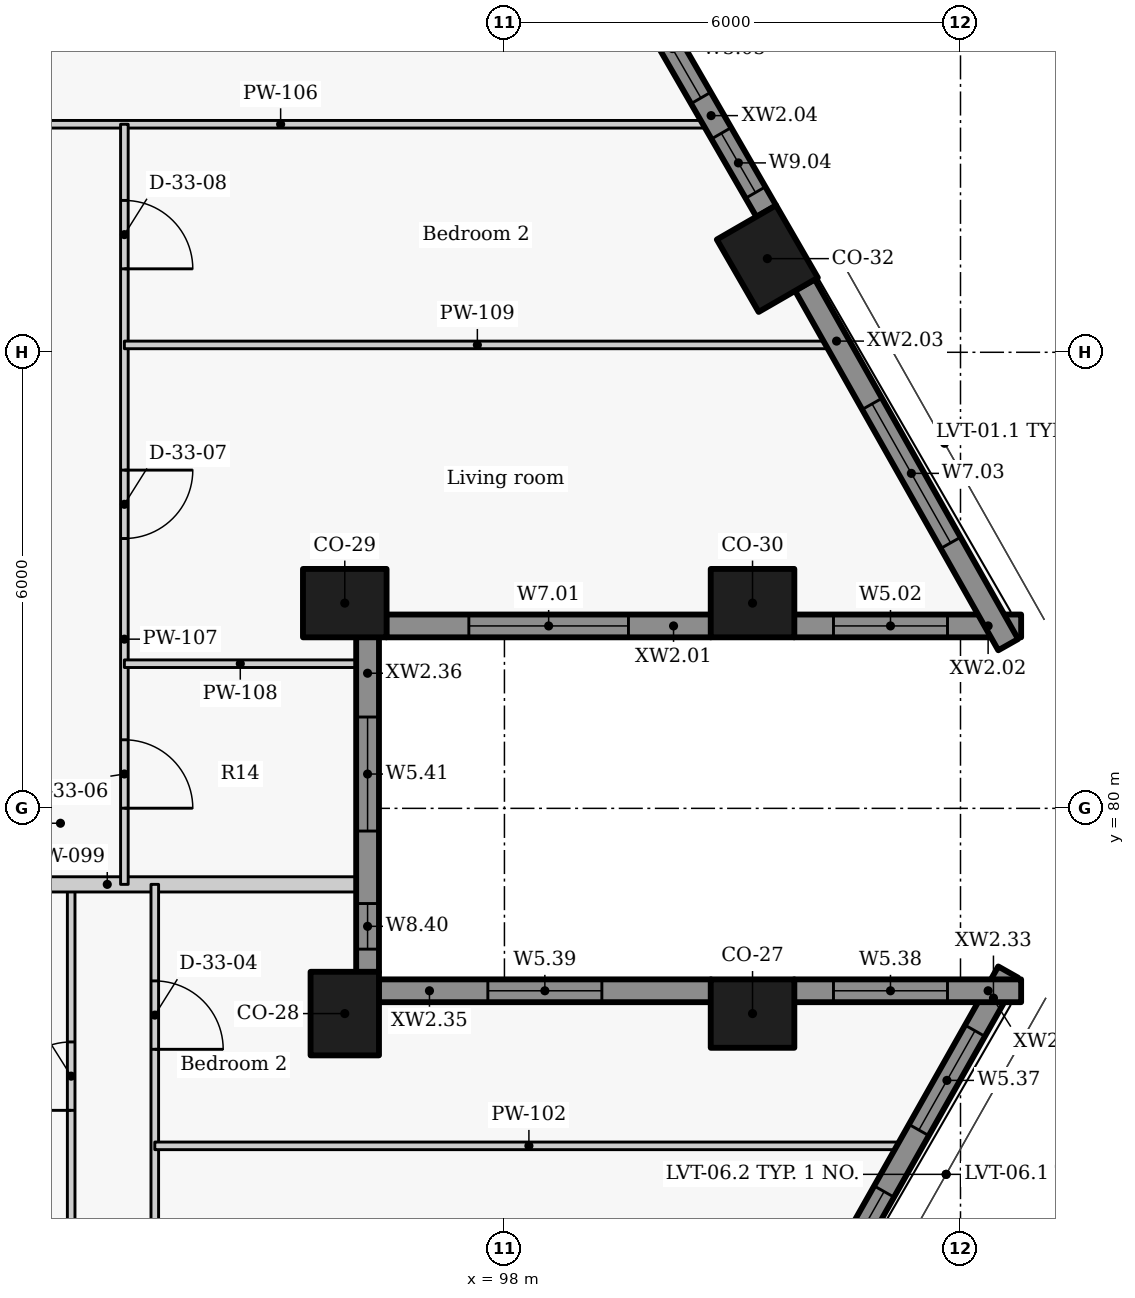
"""IFC4 building model, lengths in metres.
Left out: names, types, materials, properties, quantities, classifications, styles, units other than length and angle.
Written with IfcOpenShell. Run it as: python <this file> out.ifc"""

import sys

from ifc_helpers import new_model, si_unit, direction, frame, frame_2d, origin, origin_2d, place, context, subcontext, project, spatial, rectangle, extrude, element, fill, save


model = new_model("IFC4")
c1 = context("Model", 3, precision=1e-05, world=origin(), true_north=direction((0.0, 1.0)))
c2 = subcontext(c1, "Body", "Model", "MODEL_VIEW")
j1 = project(units=[si_unit("LENGTHUNIT", "METRE"), si_unit("PLANEANGLEUNIT", "RADIAN")], contexts=[c1])
p1 = place(None, origin())
s1 = spatial("IfcSite", under=j1, at=p1, CompositionType="ELEMENT")
p2 = place(p1, origin())
s2 = spatial("IfcBuilding", under=s1, at=p2, CompositionType="ELEMENT")
p3 = place(p2, frame((0.0, 0.0, 269.1)))
s3 = spatial("IfcBuildingStorey", under=s2, at=p3, CompositionType="ELEMENT", Elevation=269.1)
for number, where, z_axis, x_axis in (
    (1, (101.264, 77.3, 0.0), (0.0, 0.0, 1.0), (-1.0, 0.0, 0.0)),
    (2, (95.899, 77.3, 0.0), (0.0, 0.0, 1.0), (0.0, 1.0, 0.0)),
    (3, (95.899, 82.7, 0.0), (0.0, 0.0, 1.0), (1.0, 0.0, 0.0)),
    (4, (101.264, 82.7, 0.0), (0.0, 0.0, 1.0), (1.0, 0.0, 0.0)),
    (5, (101.459, 87.232, 0.0), (0.0, 0.0, 1.0), (-0.5, 0.866, 0.0)),
):
    element("IfcColumn", number, at=place(p3, frame(where, z_axis=z_axis, x_axis=x_axis)), inside=s3, PredefinedType="COLUMN", context=c2, shape_type="SweptSolid", body=[
        extrude(rectangle(XDim=1.1, YDim=0.9, at=origin_2d()), origin(), (0.0, 0.0, 1.0), 3.3),
    ])
p4 = place(p3, frame((96.446, 82.4, 0.0), z_axis=(0.0, 0.0, 1.0), x_axis=(1.0, 0.0, 0.0)))
e6 = element("IfcWall", 6, at=p4, inside=s3, PredefinedType="SOLIDWALL", context=c2, shape_type="SweptSolid", body=[
    extrude(rectangle(XDim=4.272, YDim=0.3, at=frame_2d((2.136, 0.0))), origin(), (0.0, 0.0, 1.0), 2.125),
])
p5 = place(p4, frame((1.086, 0.0, 0.9)))
e7 = element("IfcOpeningElement", 7, at=p5, cuts=e6, PredefinedType="OPENING", context=c2, shape_type="SweptSolid", body=[
    extrude(rectangle(XDim=2.1, YDim=1.1, at=frame_2d((1.05, 0.55))), frame((0.0, 0.16, 0.0), z_axis=(0.0, -1.0, 0.0), x_axis=(1.0, 0.0, 0.0)), (0.0, 0.0, 1.0), 0.32),
])
p6 = place(p3, frame((101.81, 82.4, 0.0), z_axis=(0.0, 0.0, 1.0), x_axis=(1.0, 0.0, 0.0)))
e8 = element("IfcWall", 8, at=p6, inside=s3, PredefinedType="SOLIDWALL", context=c2, shape_type="SweptSolid", body=[
    extrude(rectangle(XDim=2.988, YDim=0.3, at=frame_2d((1.494, 0.0))), origin(), (0.0, 0.0, 1.0), 2.125),
])
p7 = place(p6, frame((0.519, 0.0, 0.9)))
e9 = element("IfcOpeningElement", 9, at=p7, cuts=e8, PredefinedType="OPENING", context=c2, shape_type="SweptSolid", body=[
    extrude(rectangle(XDim=1.5, YDim=1.1, at=frame_2d((0.75, 0.55))), frame((0.0, 0.16, 0.0), z_axis=(0.0, -1.0, 0.0), x_axis=(1.0, 0.0, 0.0)), (0.0, 0.0, 1.0), 0.32),
])
p8 = place(p3, frame((104.627, 82.154, 0.0), z_axis=(0.0, 0.0, 1.0), x_axis=(-0.492080931903, 0.870549456641, 0.0)))
e10 = element("IfcWall", 10, at=p8, inside=s3, PredefinedType="SOLIDWALL", context=c2, shape_type="SweptSolid", body=[
    extrude(rectangle(XDim=5.437, YDim=0.3, at=frame_2d((2.718, 0.0))), origin(), (0.0, 0.0, 1.0), 2.125),
])
p9 = place(p8, frame((1.539, 0.0, 0.9)))
e11 = element("IfcOpeningElement", 11, at=p9, cuts=e10, PredefinedType="OPENING", context=c2, shape_type="SweptSolid", body=[
    extrude(rectangle(XDim=2.1, YDim=1.1, at=frame_2d((1.05, 0.55))), frame((0.0, 0.16, 0.0), z_axis=(0.0, -1.0, 0.0), x_axis=(1.0, 0.0, 0.0)), (0.0, 0.0, 1.0), 0.32),
])
p10 = place(p3, frame((101.446, 87.855, 0.0), z_axis=(0.0, 0.0, 1.0), x_axis=(-0.500010404316, 0.866019396766, 0.0)))
e12 = element("IfcWall", 12, at=p10, inside=s3, PredefinedType="SOLIDWALL", context=c2, shape_type="SweptSolid", body=[
    extrude(rectangle(XDim=3.547, YDim=0.3, at=frame_2d((1.774, 0.0))), origin(), (0.0, 0.0, 1.0), 2.125),
])
p11 = place(p10, frame((0.285, 0.0, 0.9)))
e13 = element("IfcOpeningElement", 13, at=p11, cuts=e12, PredefinedType="OPENING", context=c2, shape_type="SweptSolid", body=[
    extrude(rectangle(XDim=0.9, YDim=1.1, at=frame_2d((0.45, 0.55))), frame((0.0, 0.16, 0.0), z_axis=(0.0, -1.0, 0.0), x_axis=(1.0, 0.0, 0.0)), (0.0, 0.0, 1.0), 0.32),
])
p12 = place(p10, frame((1.722, 0.0, 0.9)))
e14 = element("IfcOpeningElement", 14, at=p12, cuts=e12, PredefinedType="OPENING", context=c2, shape_type="SweptSolid", body=[
    extrude(rectangle(XDim=1.5, YDim=1.1, at=frame_2d((0.75, 0.55))), frame((0.0, 0.16, 0.0), z_axis=(0.0, -1.0, 0.0), x_axis=(1.0, 0.0, 0.0)), (0.0, 0.0, 1.0), 0.32),
])
p13 = place(p3, frame((101.952, 73.114, 0.0), z_axis=(0.0, 0.0, 1.0), x_axis=(0.492080931903, 0.870549456641, 0.0)))
e15 = element("IfcWall", 15, at=p13, inside=s3, PredefinedType="SOLIDWALL", context=c2, shape_type="SweptSolid", body=[
    extrude(rectangle(XDim=5.437, YDim=0.3, at=frame_2d((2.718, 0.0))), origin(), (0.0, 0.0, 1.0), 2.125),
])
p14 = place(p13, frame((0.62, 0.0, 0.9)))
e16 = element("IfcOpeningElement", 16, at=p14, cuts=e15, PredefinedType="OPENING", context=c2, shape_type="SweptSolid", body=[
    extrude(rectangle(XDim=1.5, YDim=1.1, at=frame_2d((0.75, 0.55))), frame((0.0, 0.16, 0.0), z_axis=(0.0, -1.0, 0.0), x_axis=(1.0, 0.0, 0.0)), (0.0, 0.0, 1.0), 0.32),
])
p15 = place(p13, frame((3.05, 0.0, 0.9)))
e17 = element("IfcOpeningElement", 17, at=p15, cuts=e15, PredefinedType="OPENING", context=c2, shape_type="SweptSolid", body=[
    extrude(rectangle(XDim=1.5, YDim=1.1, at=frame_2d((0.75, 0.55))), frame((0.0, 0.16, 0.0), z_axis=(0.0, -1.0, 0.0), x_axis=(1.0, 0.0, 0.0)), (0.0, 0.0, 1.0), 0.32),
])
p16 = place(p3, frame((104.798, 77.6, 0.0), z_axis=(0.0, 0.0, 1.0), x_axis=(-1.0, 0.0, 0.0)))
e18 = element("IfcWall", 18, at=p16, inside=s3, PredefinedType="SOLIDWALL", context=c2, shape_type="SweptSolid", body=[
    extrude(rectangle(XDim=2.988, YDim=0.3, at=frame_2d((1.494, 0.0))), origin(), (0.0, 0.0, 1.0), 2.125),
])
p17 = place(p16, frame((0.969, 0.0, 0.9)))
e19 = element("IfcOpeningElement", 19, at=p17, cuts=e18, PredefinedType="OPENING", context=c2, shape_type="SweptSolid", body=[
    extrude(rectangle(XDim=1.5, YDim=1.1, at=frame_2d((0.75, 0.55))), frame((0.0, 0.16, 0.0), z_axis=(0.0, -1.0, 0.0), x_axis=(1.0, 0.0, 0.0)), (0.0, 0.0, 1.0), 0.32),
])
p18 = place(p3, frame((100.718, 77.6, 0.0), z_axis=(0.0, 0.0, 1.0), x_axis=(-1.0, 0.0, 0.0)))
e20 = element("IfcWall", 20, at=p18, inside=s3, PredefinedType="SOLIDWALL", context=c2, shape_type="SweptSolid", body=[
    extrude(rectangle(XDim=4.373, YDim=0.3, at=frame_2d((2.186, 0.0))), origin(), (0.0, 0.0, 1.0), 2.125),
])
p19 = place(p18, frame((1.436, 0.0, 0.9)))
e21 = element("IfcOpeningElement", 21, at=p19, cuts=e20, PredefinedType="OPENING", context=c2, shape_type="SweptSolid", body=[
    extrude(rectangle(XDim=1.5, YDim=1.1, at=frame_2d((0.75, 0.55))), frame((0.0, 0.16, 0.0), z_axis=(0.0, -1.0, 0.0), x_axis=(1.0, 0.0, 0.0)), (0.0, 0.0, 1.0), 0.32),
])
p20 = place(p3, frame((96.199, 77.846, 0.0), z_axis=(0.0, 0.0, 1.0), x_axis=(0.0, 1.0, 0.0)))
e22 = element("IfcWall", 22, at=p20, inside=s3, PredefinedType="SOLIDWALL", context=c2, shape_type="SweptSolid", body=[
    extrude(rectangle(XDim=4.408, YDim=0.3, at=frame_2d((2.204, 0.0))), origin(), (0.0, 0.0, 1.0), 2.125),
])
p21 = place(p20, frame((0.302, 0.0, 0.9)))
e23 = element("IfcOpeningElement", 23, at=p21, cuts=e22, PredefinedType="OPENING", context=c2, shape_type="SweptSolid", body=[
    extrude(rectangle(XDim=0.6, YDim=1.1, at=frame_2d((0.3, 0.55))), frame((0.0, 0.16, 0.0), z_axis=(0.0, -1.0, 0.0), x_axis=(1.0, 0.0, 0.0)), (0.0, 0.0, 1.0), 0.32),
])
p22 = place(p20, frame((1.856, 0.0, 0.9)))
e24 = element("IfcOpeningElement", 24, at=p22, cuts=e22, PredefinedType="OPENING", context=c2, shape_type="SweptSolid", body=[
    extrude(rectangle(XDim=1.5, YDim=1.1, at=frame_2d((0.75, 0.55))), frame((0.0, 0.16, 0.0), z_axis=(0.0, -1.0, 0.0), x_axis=(1.0, 0.0, 0.0)), (0.0, 0.0, 1.0), 0.32),
])
p23 = place(p3, frame((92.3, 69.75, 0.0), z_axis=(0.0, 0.0, 1.0), x_axis=(0.0, 1.0, 0.0)))
e25 = element("IfcWall", 25, at=p23, inside=s3, PredefinedType="PARTITIONING", context=c2, shape_type="SweptSolid", body=[
    extrude(rectangle(XDim=9.25, YDim=0.1, at=frame_2d((4.625, 0.0))), origin(), (0.0, 0.0, 1.0), 3.025),
])
p24 = place(p23, frame((1.677, 0.0, 0.0)))
e26 = element("IfcOpeningElement", 26, at=p24, cuts=e25, PredefinedType="OPENING", context=c2, shape_type="SweptSolid", body=[
    extrude(rectangle(XDim=0.85, YDim=2.1, at=frame_2d((0.425, 1.05))), frame((0.0, 0.06, 0.0), z_axis=(0.0, -1.0, 0.0), x_axis=(1.0, 0.0, 0.0)), (0.0, 0.0, 1.0), 0.12),
])
p25 = place(p23, frame((6.277, 0.0, 0.0)))
e27 = element("IfcOpeningElement", 27, at=p25, cuts=e25, PredefinedType="OPENING", context=c2, shape_type="SweptSolid", body=[
    extrude(rectangle(XDim=0.9, YDim=2.1, at=frame_2d((0.45, 1.05))), frame((0.0, 0.06, 0.0), z_axis=(0.0, -1.0, 0.0), x_axis=(1.0, 0.0, 0.0)), (0.0, 0.0, 1.0), 0.12),
])
p26 = place(p3, frame((89.5, 79.0, 0.0), z_axis=(0.0, 0.0, 1.0), x_axis=(1.0, 0.0, 0.0)))
e28 = element("IfcWall", 28, at=p26, inside=s3, PredefinedType="PARTITIONING", context=c2, shape_type="SweptSolid", body=[
    extrude(rectangle(XDim=6.55, YDim=0.2, at=frame_2d((3.275, 0.0))), origin(), (0.0, 0.0, 1.0), 2.105),
])
p27 = place(p3, frame((93.4, 79.0, 0.0), z_axis=(0.0, 0.0, 1.0), x_axis=(0.0, -1.0, 0.0)))
e29 = element("IfcWall", 29, at=p27, inside=s3, PredefinedType="PARTITIONING", context=c2, shape_type="SweptSolid", body=[
    extrude(rectangle(XDim=11.85, YDim=0.1, at=frame_2d((5.925, 0.0))), origin(), (0.0, 0.0, 1.0), 3.025),
])
p28 = place(p27, frame((9.68, 0.0, 0.0)))
e30 = element("IfcOpeningElement", 30, at=p28, cuts=e29, PredefinedType="OPENING", context=c2, shape_type="SweptSolid", body=[
    extrude(rectangle(XDim=0.9, YDim=2.1, at=frame_2d((0.45, 1.05))), frame((0.0, 0.06, 0.0), z_axis=(0.0, -1.0, 0.0), x_axis=(1.0, 0.0, 0.0)), (0.0, 0.0, 1.0), 0.12),
])
p29 = place(p27, frame((5.475, 0.0, 0.0)))
e31 = element("IfcOpeningElement", 31, at=p29, cuts=e29, PredefinedType="OPENING", context=c2, shape_type="SweptSolid", body=[
    extrude(rectangle(XDim=0.9, YDim=2.1, at=frame_2d((0.45, 1.05))), frame((0.0, 0.06, 0.0), z_axis=(0.0, -1.0, 0.0), x_axis=(1.0, 0.0, 0.0)), (0.0, 0.0, 1.0), 0.12),
])
p30 = place(p27, frame((1.27, 0.0, 0.0)))
e32 = element("IfcOpeningElement", 32, at=p30, cuts=e29, PredefinedType="OPENING", context=c2, shape_type="SweptSolid", body=[
    extrude(rectangle(XDim=0.9, YDim=2.1, at=frame_2d((0.45, 1.05))), frame((0.0, 0.06, 0.0), z_axis=(0.0, -1.0, 0.0), x_axis=(1.0, 0.0, 0.0)), (0.0, 0.0, 1.0), 0.12),
])
p31 = place(p3, frame((93.4, 75.56, 0.0), z_axis=(0.0, 0.0, 1.0), x_axis=(1.0, 0.0, 0.0)))
e33 = element("IfcWall", 33, at=p31, inside=s3, PredefinedType="PARTITIONING", context=c2, shape_type="SweptSolid", body=[
    extrude(rectangle(XDim=9.844, YDim=0.1, at=frame_2d((4.922, 0.0))), origin(), (0.0, 0.0, 1.0), 2.105),
])
p32 = place(p3, frame((89.5, 89.0, 0.0), z_axis=(0.0, 0.0, 1.0), x_axis=(1.0, 0.0, 0.0)))
e34 = element("IfcWall", 34, at=p32, inside=s3, PredefinedType="PARTITIONING", context=c2, shape_type="SweptSolid", body=[
    extrude(rectangle(XDim=11.111, YDim=0.1, at=frame_2d((5.556, 0.0))), origin(), (0.0, 0.0, 1.0), 2.105),
])
p33 = place(p3, frame((93.0, 89.0, 0.0), z_axis=(0.0, 0.0, 1.0), x_axis=(0.0, -1.0, 0.0)))
e35 = element("IfcWall", 35, at=p33, inside=s3, PredefinedType="PARTITIONING", context=c2, shape_type="SweptSolid", body=[
    extrude(rectangle(XDim=10.0, YDim=0.1, at=frame_2d((5.0, 0.0))), origin(), (0.0, 0.0, 1.0), 3.025),
])
p34 = place(p33, frame((8.098, 0.0, 0.0)))
e36 = element("IfcOpeningElement", 36, at=p34, cuts=e35, PredefinedType="OPENING", context=c2, shape_type="SweptSolid", body=[
    extrude(rectangle(XDim=0.9, YDim=2.1, at=frame_2d((0.45, 1.05))), frame((0.0, 0.06, 0.0), z_axis=(0.0, -1.0, 0.0), x_axis=(1.0, 0.0, 0.0)), (0.0, 0.0, 1.0), 0.12),
])
p35 = place(p33, frame((4.55, 0.0, 0.0)))
e37 = element("IfcOpeningElement", 37, at=p35, cuts=e35, PredefinedType="OPENING", context=c2, shape_type="SweptSolid", body=[
    extrude(rectangle(XDim=0.9, YDim=2.1, at=frame_2d((0.45, 1.05))), frame((0.0, 0.06, 0.0), z_axis=(0.0, -1.0, 0.0), x_axis=(1.0, 0.0, 0.0)), (0.0, 0.0, 1.0), 0.12),
])
p36 = place(p33, frame((1.002, 0.0, 0.0)))
e38 = element("IfcOpeningElement", 38, at=p36, cuts=e35, PredefinedType="OPENING", context=c2, shape_type="SweptSolid", body=[
    extrude(rectangle(XDim=0.9, YDim=2.1, at=frame_2d((0.45, 1.05))), frame((0.0, 0.06, 0.0), z_axis=(0.0, -1.0, 0.0), x_axis=(1.0, 0.0, 0.0)), (0.0, 0.0, 1.0), 0.12),
])
p37 = place(p3, frame((93.0, 81.903, 0.0), z_axis=(0.0, 0.0, 1.0), x_axis=(1.0, 0.0, 0.0)))
e39 = element("IfcWall", 39, at=p37, inside=s3, PredefinedType="PARTITIONING", context=c2, shape_type="SweptSolid", body=[
    extrude(rectangle(XDim=3.05, YDim=0.1, at=frame_2d((1.525, 0.0))), origin(), (0.0, 0.0, 1.0), 2.105),
])
p38 = place(p3, frame((93.0, 86.097, 0.0), z_axis=(0.0, 0.0, 1.0), x_axis=(1.0, 0.0, 0.0)))
e40 = element("IfcWall", 40, at=p38, inside=s3, PredefinedType="PARTITIONING", context=c2, shape_type="SweptSolid", body=[
    extrude(rectangle(XDim=9.288, YDim=0.1, at=frame_2d((4.644, 0.0))), origin(), (0.0, 0.0, 1.0), 2.105),
])
p39 = place(p5, origin())
e41 = element("IfcWindow", 41, at=p39, inside=s3, PartitioningType="SINGLE_PANEL", PredefinedType="WINDOW", context=c2, shape_type="SweptSolid", body=[
    extrude(rectangle(XDim=2.1, YDim=1.1, at=frame_2d((1.05, 0.55))), frame((0.0, 0.03, 0.0), z_axis=(0.0, -1.0, 0.0), x_axis=(1.0, 0.0, 0.0)), (0.0, 0.0, 1.0), 0.06),
])
fill(e7, e41)
p40 = place(p7, origin())
e42 = element("IfcWindow", 42, at=p40, inside=s3, PartitioningType="SINGLE_PANEL", PredefinedType="WINDOW", context=c2, shape_type="SweptSolid", body=[
    extrude(rectangle(XDim=1.5, YDim=1.1, at=frame_2d((0.75, 0.55))), frame((0.0, 0.03, 0.0), z_axis=(0.0, -1.0, 0.0), x_axis=(1.0, 0.0, 0.0)), (0.0, 0.0, 1.0), 0.06),
])
fill(e9, e42)
p41 = place(p9, origin())
e43 = element("IfcWindow", 43, at=p41, inside=s3, PartitioningType="SINGLE_PANEL", PredefinedType="WINDOW", context=c2, shape_type="SweptSolid", body=[
    extrude(rectangle(XDim=2.1, YDim=1.1, at=frame_2d((1.05, 0.55))), frame((0.0, 0.03, 0.0), z_axis=(0.0, -1.0, 0.0), x_axis=(1.0, 0.0, 0.0)), (0.0, 0.0, 1.0), 0.06),
])
fill(e11, e43)
p42 = place(p11, origin())
e44 = element("IfcWindow", 44, at=p42, inside=s3, PartitioningType="SINGLE_PANEL", PredefinedType="WINDOW", context=c2, shape_type="SweptSolid", body=[
    extrude(rectangle(XDim=0.9, YDim=1.1, at=frame_2d((0.45, 0.55))), frame((0.0, 0.03, 0.0), z_axis=(0.0, -1.0, 0.0), x_axis=(1.0, 0.0, 0.0)), (0.0, 0.0, 1.0), 0.06),
])
fill(e13, e44)
p43 = place(p12, origin())
e45 = element("IfcWindow", 45, at=p43, inside=s3, PartitioningType="SINGLE_PANEL", PredefinedType="WINDOW", context=c2, shape_type="SweptSolid", body=[
    extrude(rectangle(XDim=1.5, YDim=1.1, at=frame_2d((0.75, 0.55))), frame((0.0, 0.03, 0.0), z_axis=(0.0, -1.0, 0.0), x_axis=(1.0, 0.0, 0.0)), (0.0, 0.0, 1.0), 0.06),
])
fill(e14, e45)
p44 = place(p14, origin())
e46 = element("IfcWindow", 46, at=p44, inside=s3, PartitioningType="SINGLE_PANEL", PredefinedType="WINDOW", context=c2, shape_type="SweptSolid", body=[
    extrude(rectangle(XDim=1.5, YDim=1.1, at=frame_2d((0.75, 0.55))), frame((0.0, 0.03, 0.0), z_axis=(0.0, -1.0, 0.0), x_axis=(1.0, 0.0, 0.0)), (0.0, 0.0, 1.0), 0.06),
])
fill(e16, e46)
p45 = place(p15, origin())
e47 = element("IfcWindow", 47, at=p45, inside=s3, PartitioningType="SINGLE_PANEL", PredefinedType="WINDOW", context=c2, shape_type="SweptSolid", body=[
    extrude(rectangle(XDim=1.5, YDim=1.1, at=frame_2d((0.75, 0.55))), frame((0.0, 0.03, 0.0), z_axis=(0.0, -1.0, 0.0), x_axis=(1.0, 0.0, 0.0)), (0.0, 0.0, 1.0), 0.06),
])
fill(e17, e47)
p46 = place(p17, origin())
e48 = element("IfcWindow", 48, at=p46, inside=s3, PartitioningType="SINGLE_PANEL", PredefinedType="WINDOW", context=c2, shape_type="SweptSolid", body=[
    extrude(rectangle(XDim=1.5, YDim=1.1, at=frame_2d((0.75, 0.55))), frame((0.0, 0.03, 0.0), z_axis=(0.0, -1.0, 0.0), x_axis=(1.0, 0.0, 0.0)), (0.0, 0.0, 1.0), 0.06),
])
fill(e19, e48)
p47 = place(p19, origin())
e49 = element("IfcWindow", 49, at=p47, inside=s3, PartitioningType="SINGLE_PANEL", PredefinedType="WINDOW", context=c2, shape_type="SweptSolid", body=[
    extrude(rectangle(XDim=1.5, YDim=1.1, at=frame_2d((0.75, 0.55))), frame((0.0, 0.03, 0.0), z_axis=(0.0, -1.0, 0.0), x_axis=(1.0, 0.0, 0.0)), (0.0, 0.0, 1.0), 0.06),
])
fill(e21, e49)
p48 = place(p21, origin())
e50 = element("IfcWindow", 50, at=p48, inside=s3, PartitioningType="SINGLE_PANEL", PredefinedType="WINDOW", context=c2, shape_type="SweptSolid", body=[
    extrude(rectangle(XDim=0.6, YDim=1.1, at=frame_2d((0.3, 0.55))), frame((0.0, 0.03, 0.0), z_axis=(0.0, -1.0, 0.0), x_axis=(1.0, 0.0, 0.0)), (0.0, 0.0, 1.0), 0.06),
])
fill(e23, e50)
p49 = place(p22, origin())
e51 = element("IfcWindow", 51, at=p49, inside=s3, PartitioningType="SINGLE_PANEL", PredefinedType="WINDOW", context=c2, shape_type="SweptSolid", body=[
    extrude(rectangle(XDim=1.5, YDim=1.1, at=frame_2d((0.75, 0.55))), frame((0.0, 0.03, 0.0), z_axis=(0.0, -1.0, 0.0), x_axis=(1.0, 0.0, 0.0)), (0.0, 0.0, 1.0), 0.06),
])
fill(e24, e51)
p50 = place(p25, origin())
e52 = element("IfcDoor", 52, at=p50, inside=s3, OperationType="SINGLE_SWING_LEFT", PredefinedType="DOOR", context=c2, shape_type="SweptSolid", body=[
    extrude(rectangle(XDim=0.9, YDim=2.1, at=frame_2d((0.45, 1.05))), frame((0.0, 0.025, 0.0), z_axis=(0.0, -1.0, 0.0), x_axis=(1.0, 0.0, 0.0)), (0.0, 0.0, 1.0), 0.05),
])
fill(e27, e52)
p51 = place(p30, origin())
e53 = element("IfcDoor", 53, at=p51, inside=s3, OperationType="SINGLE_SWING_RIGHT", PredefinedType="DOOR", context=c2, shape_type="SweptSolid", body=[
    extrude(rectangle(XDim=0.9, YDim=2.1, at=frame_2d((0.45, 1.05))), frame((0.0, 0.025, 0.0), z_axis=(0.0, -1.0, 0.0), x_axis=(1.0, 0.0, 0.0)), (0.0, 0.0, 1.0), 0.05),
])
fill(e32, e53)
p52 = place(p34, origin())
e54 = element("IfcDoor", 54, at=p52, inside=s3, OperationType="SINGLE_SWING_RIGHT", PredefinedType="DOOR", context=c2, shape_type="SweptSolid", body=[
    extrude(rectangle(XDim=0.9, YDim=2.1, at=frame_2d((0.45, 1.05))), frame((0.0, 0.025, 0.0), z_axis=(0.0, -1.0, 0.0), x_axis=(1.0, 0.0, 0.0)), (0.0, 0.0, 1.0), 0.05),
])
fill(e36, e54)
p53 = place(p35, origin())
e55 = element("IfcDoor", 55, at=p53, inside=s3, OperationType="SINGLE_SWING_LEFT", PredefinedType="DOOR", context=c2, shape_type="SweptSolid", body=[
    extrude(rectangle(XDim=0.9, YDim=2.1, at=frame_2d((0.45, 1.05))), frame((0.0, 0.025, 0.0), z_axis=(0.0, -1.0, 0.0), x_axis=(1.0, 0.0, 0.0)), (0.0, 0.0, 1.0), 0.05),
])
fill(e37, e55)
p54 = place(p36, origin())
e56 = element("IfcDoor", 56, at=p54, inside=s3, OperationType="SINGLE_SWING_RIGHT", PredefinedType="DOOR", context=c2, shape_type="SweptSolid", body=[
    extrude(rectangle(XDim=0.9, YDim=2.1, at=frame_2d((0.45, 1.05))), frame((0.0, 0.025, 0.0), z_axis=(0.0, -1.0, 0.0), x_axis=(1.0, 0.0, 0.0)), (0.0, 0.0, 1.0), 0.05),
])
fill(e38, e56)
save(model, sys.argv[1])
